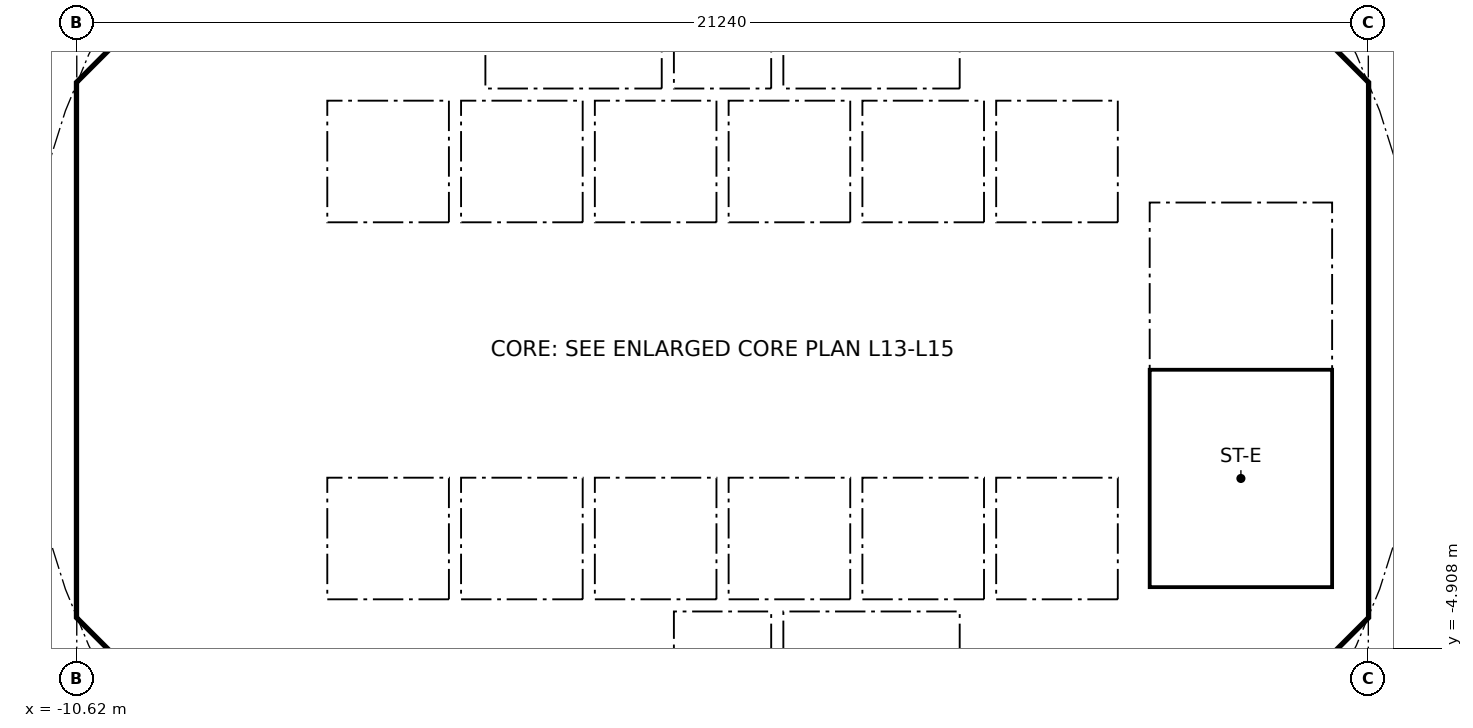
"""IFC4 building model, lengths in metres.
Left out: names, types, materials, properties, quantities, classifications, styles, units other than length and angle.
Written with IfcOpenShell. Run it as: python <this file> out.ifc"""

import sys

from ifc_helpers import new_model, si_unit, direction, frame, frame_2d, origin, place, context, subcontext, project, spatial, polyline, rectangle, outline, extrude, element, fill, save


model = new_model("IFC4")
c1 = context("Model", 3, precision=1e-05, world=origin(), true_north=direction((0.0, 1.0)))
c2 = subcontext(c1, "Body", "Model", "MODEL_VIEW")
j1 = project(units=[si_unit("LENGTHUNIT", "METRE"), si_unit("PLANEANGLEUNIT", "RADIAN")], contexts=[c1])
p1 = place(None, origin())
s1 = spatial("IfcSite", under=j1, at=p1, CompositionType="ELEMENT")
p2 = place(p1, origin())
s2 = spatial("IfcBuilding", under=s1, at=p2, CompositionType="ELEMENT")
p3 = place(p2, frame((0.0, 0.0, 56.6)))
s3 = spatial("IfcBuildingStorey", under=s2, at=p3, CompositionType="ELEMENT", Elevation=56.6)
p4 = place(p3, frame((9.988, 4.613, 0.0), z_axis=(0.0, 0.0, 1.0), x_axis=(-0.707106781187, 0.707106781187, 0.0)))
e1 = element("IfcWall", 1, at=p4, inside=s3, PredefinedType="SHEAR", context=c2, shape_type="SweptSolid", body=[
    extrude(rectangle(XDim=7.602, YDim=0.6, at=frame_2d((3.801, 0.0))), origin(), (0.0, 0.0, 1.0), 3.44),
])
p5 = place(p4, frame((3.201, 0.0, 0.0)))
e2 = element("IfcOpeningElement", 2, at=p5, cuts=e1, PredefinedType="OPENING", context=c2, shape_type="SweptSolid", body=[
    extrude(rectangle(XDim=1.2, YDim=2.1, at=frame_2d((0.6, 1.05))), frame((0.0, 0.31, 0.0), z_axis=(0.0, -1.0, 0.0), x_axis=(1.0, 0.0, 0.0)), (0.0, 0.0, 1.0), 0.62),
])
p6 = place(p3, frame((-4.613, 9.988, 0.0), z_axis=(0.0, 0.0, 1.0), x_axis=(-0.707106781187, -0.707106781187, 0.0)))
e3 = element("IfcWall", 3, at=p6, inside=s3, PredefinedType="SHEAR", context=c2, shape_type="SweptSolid", body=[
    extrude(rectangle(XDim=7.602, YDim=0.6, at=frame_2d((3.801, 0.0))), origin(), (0.0, 0.0, 1.0), 3.44),
])
p7 = place(p6, frame((0.351, 0.0, 0.0)))
e4 = element("IfcOpeningElement", 4, at=p7, cuts=e3, PredefinedType="OPENING", context=c2, shape_type="SweptSolid", body=[
    extrude(rectangle(XDim=1.1, YDim=2.1, at=frame_2d((0.55, 1.05))), frame((0.0, 0.31, 0.0), z_axis=(0.0, -1.0, 0.0), x_axis=(1.0, 0.0, 0.0)), (0.0, 0.0, 1.0), 0.62),
])
p8 = place(p3, frame((-10.325, 3.801, 0.0), z_axis=(0.0, 0.0, 1.0), x_axis=(0.0, -1.0, 0.0)))
e5 = element("IfcWall", 5, at=p8, inside=s3, PredefinedType="SHEAR", context=c2, shape_type="SweptSolid", body=[
    extrude(rectangle(XDim=7.602, YDim=0.6, at=frame_2d((3.801, 0.0))), origin(), (0.0, 0.0, 1.0), 3.44),
])
p9 = place(p8, frame((0.651, 0.0, 0.0)))
e6 = element("IfcOpeningElement", 6, at=p9, cuts=e5, PredefinedType="OPENING", context=c2, shape_type="SweptSolid", body=[
    extrude(rectangle(XDim=1.5, YDim=2.1, at=frame_2d((0.75, 1.05))), frame((0.0, 0.31, 0.0), z_axis=(0.0, -1.0, 0.0), x_axis=(1.0, 0.0, 0.0)), (0.0, 0.0, 1.0), 0.62),
])
p10 = place(p8, frame((5.451, 0.0, 0.0)))
e7 = element("IfcOpeningElement", 7, at=p10, cuts=e5, PredefinedType="OPENING", context=c2, shape_type="SweptSolid", body=[
    extrude(rectangle(XDim=1.5, YDim=2.1, at=frame_2d((0.75, 1.05))), frame((0.0, 0.31, 0.0), z_axis=(0.0, -1.0, 0.0), x_axis=(1.0, 0.0, 0.0)), (0.0, 0.0, 1.0), 0.62),
])
p11 = place(p3, frame((-9.988, -4.613, 0.0), z_axis=(0.0, 0.0, 1.0), x_axis=(0.707106781187, -0.707106781187, 0.0)))
e8 = element("IfcWall", 8, at=p11, inside=s3, PredefinedType="SHEAR", context=c2, shape_type="SweptSolid", body=[
    extrude(rectangle(XDim=7.602, YDim=0.6, at=frame_2d((3.801, 0.0))), origin(), (0.0, 0.0, 1.0), 3.44),
])
p12 = place(p11, frame((6.151, 0.0, 0.0)))
e9 = element("IfcOpeningElement", 9, at=p12, cuts=e8, PredefinedType="OPENING", context=c2, shape_type="SweptSolid", body=[
    extrude(rectangle(XDim=1.1, YDim=2.1, at=frame_2d((0.55, 1.05))), frame((0.0, 0.31, 0.0), z_axis=(0.0, -1.0, 0.0), x_axis=(1.0, 0.0, 0.0)), (0.0, 0.0, 1.0), 0.62),
])
p13 = place(p3, frame((4.613, -9.988, 0.0), z_axis=(0.0, 0.0, 1.0), x_axis=(0.707106781187, 0.707106781187, 0.0)))
e10 = element("IfcWall", 10, at=p13, inside=s3, PredefinedType="SHEAR", context=c2, shape_type="SweptSolid", body=[
    extrude(rectangle(XDim=7.602, YDim=0.6, at=frame_2d((3.801, 0.0))), origin(), (0.0, 0.0, 1.0), 3.44),
])
p14 = place(p13, frame((3.201, 0.0, 0.0)))
e11 = element("IfcOpeningElement", 11, at=p14, cuts=e10, PredefinedType="OPENING", context=c2, shape_type="SweptSolid", body=[
    extrude(rectangle(XDim=1.2, YDim=2.1, at=frame_2d((0.6, 1.05))), frame((0.0, 0.31, 0.0), z_axis=(0.0, -1.0, 0.0), x_axis=(1.0, 0.0, 0.0)), (0.0, 0.0, 1.0), 0.62),
])
p15 = place(p3, frame((-5.8, 4.3, 0.0), z_axis=(0.0, 0.0, 1.0), x_axis=(0.0, 1.0, 0.0)))
e12 = element("IfcWall", 12, at=p15, inside=s3, PredefinedType="PARTITIONING", context=c2, shape_type="SweptSolid", body=[
    extrude(rectangle(XDim=3.927, YDim=0.15, at=frame_2d((1.963, 0.0))), origin(), (0.0, 0.0, 1.0), 3.44),
])
p16 = place(p15, frame((0.413, 0.0, 0.0)))
e13 = element("IfcOpeningElement", 13, at=p16, cuts=e12, PredefinedType="OPENING", context=c2, shape_type="SweptSolid", body=[
    extrude(rectangle(XDim=0.9, YDim=2.1, at=frame_2d((0.45, 1.05))), frame((0.0, 0.085, 0.0), z_axis=(0.0, -1.0, 0.0), x_axis=(1.0, 0.0, 0.0)), (0.0, 0.0, 1.0), 0.17),
])
p17 = place(p15, frame((2.489, 0.0, 0.0)))
e14 = element("IfcOpeningElement", 14, at=p17, cuts=e12, PredefinedType="OPENING", context=c2, shape_type="SweptSolid", body=[
    extrude(rectangle(XDim=0.9, YDim=2.1, at=frame_2d((0.45, 1.05))), frame((0.0, 0.085, 0.0), z_axis=(0.0, -1.0, 0.0), x_axis=(1.0, 0.0, 0.0)), (0.0, 0.0, 1.0), 0.17),
])
p18 = place(p3, frame((4.0, 4.3, 0.0), z_axis=(0.0, 0.0, 1.0), x_axis=(0.0, 1.0, 0.0)))
e15 = element("IfcWall", 15, at=p18, inside=s3, PredefinedType="SOLIDWALL", context=c2, shape_type="SweptSolid", body=[
    extrude(rectangle(XDim=2.2, YDim=0.2, at=frame_2d((1.1, 0.0))), origin(), (0.0, 0.0, 1.0), 3.44),
])
p19 = place(p18, frame((0.55, 0.0, 0.0)))
e16 = element("IfcOpeningElement", 16, at=p19, cuts=e15, PredefinedType="OPENING", context=c2, shape_type="SweptSolid", body=[
    extrude(rectangle(XDim=1.1, YDim=2.1, at=frame_2d((0.55, 1.05))), frame((0.0, 0.11, 0.0), z_axis=(0.0, -1.0, 0.0), x_axis=(1.0, 0.0, 0.0)), (0.0, 0.0, 1.0), 0.22),
])
p20 = place(p3, frame((-4.0, 4.3, 0.0), z_axis=(0.0, 0.0, 1.0), x_axis=(0.0, 1.0, 0.0)))
e17 = element("IfcWall", 17, at=p20, inside=s3, PredefinedType="SOLIDWALL", context=c2, shape_type="SweptSolid", body=[
    extrude(rectangle(XDim=2.2, YDim=0.2, at=frame_2d((1.1, 0.0))), origin(), (0.0, 0.0, 1.0), 3.44),
])
p21 = place(p20, frame((0.55, 0.0, 0.0)))
e18 = element("IfcOpeningElement", 18, at=p21, cuts=e17, PredefinedType="OPENING", context=c2, shape_type="SweptSolid", body=[
    extrude(rectangle(XDim=1.1, YDim=2.1, at=frame_2d((0.55, 1.05))), frame((0.0, 0.11, 0.0), z_axis=(0.0, -1.0, 0.0), x_axis=(1.0, 0.0, 0.0)), (0.0, 0.0, 1.0), 0.22),
])
p22 = place(p3, frame((-6.7, 2.0, 0.0), z_axis=(0.0, 0.0, 1.0), x_axis=(1.0, 0.0, 0.0)))
e19 = element("IfcWall", 19, at=p22, inside=s3, PredefinedType="SOLIDWALL", context=c2, shape_type="SweptSolid", body=[
    extrude(rectangle(XDim=13.4, YDim=0.2, at=frame_2d((6.7, 0.0))), origin(), (0.0, 0.0, 1.0), 3.44),
])
p23 = place(p22, frame((0.65, 0.0, 0.0)))
e20 = element("IfcOpeningElement", 20, at=p23, cuts=e19, PredefinedType="OPENING", context=c2, shape_type="SweptSolid", body=[
    extrude(rectangle(XDim=1.1, YDim=2.1, at=frame_2d((0.55, 1.05))), frame((0.0, 0.11, 0.0), z_axis=(0.0, -1.0, 0.0), x_axis=(1.0, 0.0, 0.0)), (0.0, 0.0, 1.0), 0.22),
])
p24 = place(p22, frame((2.85, 0.0, 0.0)))
e21 = element("IfcOpeningElement", 21, at=p24, cuts=e19, PredefinedType="OPENING", context=c2, shape_type="SweptSolid", body=[
    extrude(rectangle(XDim=1.1, YDim=2.1, at=frame_2d((0.55, 1.05))), frame((0.0, 0.11, 0.0), z_axis=(0.0, -1.0, 0.0), x_axis=(1.0, 0.0, 0.0)), (0.0, 0.0, 1.0), 0.22),
])
p25 = place(p22, frame((5.05, 0.0, 0.0)))
e22 = element("IfcOpeningElement", 22, at=p25, cuts=e19, PredefinedType="OPENING", context=c2, shape_type="SweptSolid", body=[
    extrude(rectangle(XDim=1.1, YDim=2.1, at=frame_2d((0.55, 1.05))), frame((0.0, 0.11, 0.0), z_axis=(0.0, -1.0, 0.0), x_axis=(1.0, 0.0, 0.0)), (0.0, 0.0, 1.0), 0.22),
])
p26 = place(p3, frame((6.7, 4.0, 0.0), z_axis=(0.0, 0.0, 1.0), x_axis=(1.0, 0.0, 0.0)))
e23 = element("IfcWall", 23, at=p26, inside=s3, PredefinedType="SOLIDWALL", context=c2, shape_type="SweptSolid", body=[
    extrude(rectangle(XDim=3.325, YDim=0.2, at=frame_2d((1.662, 0.0))), origin(), (0.0, 0.0, 1.0), 3.44),
])
p27 = place(p26, frame((1.25, 0.0, 0.0)))
e24 = element("IfcOpeningElement", 24, at=p27, cuts=e23, PredefinedType="OPENING", context=c2, shape_type="SweptSolid", body=[
    extrude(rectangle(XDim=1.1, YDim=2.1, at=frame_2d((0.55, 1.05))), frame((0.0, 0.11, 0.0), z_axis=(0.0, -1.0, 0.0), x_axis=(1.0, 0.0, 0.0)), (0.0, 0.0, 1.0), 0.22),
])
p28 = place(p3, frame((-7.4, -6.627, 0.0), z_axis=(0.0, 0.0, 1.0), x_axis=(0.0, 1.0, 0.0)))
e25 = element("IfcWall", 25, at=p28, inside=s3, PredefinedType="PARTITIONING", context=c2, shape_type="SweptSolid", body=[
    extrude(rectangle(XDim=2.527, YDim=0.15, at=frame_2d((1.263, 0.0))), origin(), (0.0, 0.0, 1.0), 3.44),
])
p29 = place(p28, frame((0.776, 0.0, 0.0)))
e26 = element("IfcOpeningElement", 26, at=p29, cuts=e25, PredefinedType="OPENING", context=c2, shape_type="SweptSolid", body=[
    extrude(rectangle(XDim=0.9, YDim=2.1, at=frame_2d((0.45, 1.05))), frame((0.0, 0.085, 0.0), z_axis=(0.0, -1.0, 0.0), x_axis=(1.0, 0.0, 0.0)), (0.0, 0.0, 1.0), 0.17),
])
p30 = place(p3, frame((4.0, -6.5, 0.0), z_axis=(0.0, 0.0, 1.0), x_axis=(0.0, 1.0, 0.0)))
e27 = element("IfcWall", 27, at=p30, inside=s3, PredefinedType="SOLIDWALL", context=c2, shape_type="SweptSolid", body=[
    extrude(rectangle(XDim=2.2, YDim=0.2, at=frame_2d((1.1, 0.0))), origin(), (0.0, 0.0, 1.0), 3.44),
])
p31 = place(p30, frame((0.55, 0.0, 0.0)))
e28 = element("IfcOpeningElement", 28, at=p31, cuts=e27, PredefinedType="OPENING", context=c2, shape_type="SweptSolid", body=[
    extrude(rectangle(XDim=1.1, YDim=2.1, at=frame_2d((0.55, 1.05))), frame((0.0, 0.11, 0.0), z_axis=(0.0, -1.0, 0.0), x_axis=(1.0, 0.0, 0.0)), (0.0, 0.0, 1.0), 0.22),
])
p32 = place(p3, frame((-4.0, -6.5, 0.0), z_axis=(0.0, 0.0, 1.0), x_axis=(0.0, 1.0, 0.0)))
e29 = element("IfcWall", 29, at=p32, inside=s3, PredefinedType="SOLIDWALL", context=c2, shape_type="SweptSolid", body=[
    extrude(rectangle(XDim=2.2, YDim=0.2, at=frame_2d((1.1, 0.0))), origin(), (0.0, 0.0, 1.0), 3.44),
])
p33 = place(p32, frame((0.65, 0.0, 0.0)))
e30 = element("IfcOpeningElement", 30, at=p33, cuts=e29, PredefinedType="OPENING", context=c2, shape_type="SweptSolid", body=[
    extrude(rectangle(XDim=0.9, YDim=2.1, at=frame_2d((0.45, 1.05))), frame((0.0, 0.11, 0.0), z_axis=(0.0, -1.0, 0.0), x_axis=(1.0, 0.0, 0.0)), (0.0, 0.0, 1.0), 0.22),
])
p34 = place(p3, frame((-6.7, -2.0, 0.0), z_axis=(0.0, 0.0, 1.0), x_axis=(1.0, 0.0, 0.0)))
e31 = element("IfcWall", 31, at=p34, inside=s3, PredefinedType="SOLIDWALL", context=c2, shape_type="SweptSolid", body=[
    extrude(rectangle(XDim=13.4, YDim=0.2, at=frame_2d((6.7, 0.0))), origin(), (0.0, 0.0, 1.0), 3.44),
])
p35 = place(p34, frame((0.65, 0.0, 0.0)))
e32 = element("IfcOpeningElement", 32, at=p35, cuts=e31, PredefinedType="OPENING", context=c2, shape_type="SweptSolid", body=[
    extrude(rectangle(XDim=1.1, YDim=2.1, at=frame_2d((0.55, 1.05))), frame((0.0, 0.11, 0.0), z_axis=(0.0, -1.0, 0.0), x_axis=(1.0, 0.0, 0.0)), (0.0, 0.0, 1.0), 0.22),
])
p36 = place(p34, frame((2.85, 0.0, 0.0)))
e33 = element("IfcOpeningElement", 33, at=p36, cuts=e31, PredefinedType="OPENING", context=c2, shape_type="SweptSolid", body=[
    extrude(rectangle(XDim=1.1, YDim=2.1, at=frame_2d((0.55, 1.05))), frame((0.0, 0.11, 0.0), z_axis=(0.0, -1.0, 0.0), x_axis=(1.0, 0.0, 0.0)), (0.0, 0.0, 1.0), 0.22),
])
p37 = place(p3, origin())
e34 = element("IfcWall", 34, at=p37, inside=s3, PredefinedType="SHEAR", context=c2, shape_type="SweptSolid", body=[
    extrude(outline(polyline([(-10.625, -3.801), (-10.025, -3.801), (-10.025, -4.152), (-9.776, -4.401), (-10.2, -4.825), (-10.625, -4.401), (-10.625, -3.801)])), origin(), (0.0, 0.0, 1.0), 3.44),
])
p38 = place(p3, origin())
e35 = element("IfcWall", 35, at=p38, inside=s3, PredefinedType="SHEAR", context=c2, shape_type="SweptSolid", body=[
    extrude(outline(polyline([(-10.2, 4.825), (-9.776, 4.401), (-10.025, 4.152), (-10.025, 3.801), (-10.625, 3.801), (-10.625, 4.401), (-10.2, 4.825)])), origin(), (0.0, 0.0, 1.0), 3.44),
])
p39 = place(p3, origin())
e36 = element("IfcWall", 36, at=p39, inside=s3, PredefinedType="SHEAR", context=c2, shape_type="SweptSolid", body=[
    extrude(outline(polyline([(9.776, -4.401), (10.025, -4.152), (10.025, -3.801), (10.025, 4.152), (9.776, 4.401), (10.2, 4.825), (10.625, 4.401), (10.625, -4.401), (10.2, -4.825), (9.776, -4.401)])), origin(), (0.0, 0.0, 1.0), 3.44),
])
for number, where, z_axis, x_axis in (
    (37, (-10.025, -4.0, 0.0), (0.0, 0.0, 1.0), (1.0, 0.0, 0.0)),
    (38, (-10.025, 4.0, 0.0), (0.0, 0.0, 1.0), (1.0, 0.0, 0.0)),
):
    element("IfcWall", number, at=place(p3, frame(where, z_axis=z_axis, x_axis=x_axis)), inside=s3, PredefinedType="PARTITIONING", context=c2, shape_type="SweptSolid", body=[
        extrude(rectangle(XDim=3.325, YDim=0.2, at=frame_2d((1.662, 0.0))), origin(), (0.0, 0.0, 1.0), 3.44),
    ])
for number, where, z_axis, x_axis in (
    (39, (-0.9, -6.5, 0.0), (0.0, 0.0, 1.0), (0.0, 1.0, 0.0)),
    (40, (0.9, -6.5, 0.0), (0.0, 0.0, 1.0), (0.0, 1.0, 0.0)),
):
    element("IfcWall", number, at=place(p3, frame(where, z_axis=z_axis, x_axis=x_axis)), inside=s3, PredefinedType="SOLIDWALL", context=c2, shape_type="SweptSolid", body=[
        extrude(rectangle(XDim=2.2, YDim=0.2, at=frame_2d((1.1, 0.0))), origin(), (0.0, 0.0, 1.0), 3.44),
    ])
p40 = place(p3, origin())
e41 = element("IfcWall", 41, at=p40, inside=s3, PredefinedType="SOLIDWALL", context=c2, shape_type="SweptSolid", body=[
    extrude(outline(polyline([(-6.7, -2.1), (-6.5, -2.1), (-6.5, -4.1), (-4.5, -4.1), (-4.5, -2.1), (-4.3, -2.1), (-4.3, -4.1), (-2.3, -4.1), (-2.3, -2.1), (-2.1, -2.1), (-2.1, -4.1), (-0.1, -4.1), (-0.1, -2.1), (0.1, -2.1), (0.1, -4.1), (2.1, -4.1), (2.1, -2.1), (2.3, -2.1), (2.3, -4.1), (4.3, -4.1), (4.3, -2.1), (4.5, -2.1), (4.5, -4.1), (6.5, -4.1), (6.5, -2.1), (6.7, -2.1), (6.7, -4.3), (-6.7, -4.3), (-6.7, -2.1)])), origin(), (0.0, 0.0, 1.0), 3.44),
])
for number, where, z_axis, x_axis in (
    (42, (-0.9, 4.3, 0.0), (0.0, 0.0, 1.0), (0.0, 1.0, 0.0)),
    (43, (0.9, 4.3, 0.0), (0.0, 0.0, 1.0), (0.0, 1.0, 0.0)),
):
    element("IfcWall", number, at=place(p3, frame(where, z_axis=z_axis, x_axis=x_axis)), inside=s3, PredefinedType="SOLIDWALL", context=c2, shape_type="SweptSolid", body=[
        extrude(rectangle(XDim=2.2, YDim=0.2, at=frame_2d((1.1, 0.0))), origin(), (0.0, 0.0, 1.0), 3.44),
    ])
p41 = place(p3, origin())
e44 = element("IfcWall", 44, at=p41, inside=s3, PredefinedType="SOLIDWALL", context=c2, shape_type="SweptSolid", body=[
    extrude(outline(polyline([(-6.5, 2.1), (-6.7, 2.1), (-6.7, 4.3), (6.7, 4.3), (6.7, 2.1), (6.5, 2.1), (6.5, 4.1), (4.5, 4.1), (4.5, 2.1), (4.3, 2.1), (4.3, 4.1), (2.3, 4.1), (2.3, 2.1), (2.1, 2.1), (2.1, 4.1), (0.1, 4.1), (0.1, 2.1), (-0.1, 2.1), (-0.1, 4.1), (-2.1, 4.1), (-2.1, 2.1), (-2.3, 2.1), (-2.3, 4.1), (-4.3, 4.1), (-4.3, 2.1), (-4.5, 2.1), (-4.5, 4.1), (-6.5, 4.1), (-6.5, 2.1)])), origin(), (0.0, 0.0, 1.0), 3.44),
])
p42 = place(p3, origin())
e45 = element("IfcWall", 45, at=p42, inside=s3, PredefinedType="SOLIDWALL", context=c2, shape_type="SweptSolid", body=[
    extrude(outline(polyline([(7.025, -3.9), (6.7, -3.9), (6.7, 3.9), (7.025, 3.9), (7.025, -3.9)])), origin(), (0.0, 0.0, 1.0), 3.44),
])
p43 = place(p3, origin())
e46 = element("IfcWall", 46, at=p43, inside=s3, PredefinedType="SOLIDWALL", context=c2, shape_type="SweptSolid", body=[
    extrude(outline(polyline([(10.025, -4.1), (6.7, -4.1), (6.7, -3.9), (10.025, -3.9), (10.025, -4.1)])), origin(), (0.0, 0.0, 1.0), 3.44),
])
p44 = place(p23, origin())
e47 = element("IfcDoor", 47, at=p44, inside=s3, OperationType="DOUBLE_DOOR_SLIDING", PredefinedType="DOOR", context=c2, shape_type="SweptSolid", body=[
    extrude(rectangle(XDim=1.1, YDim=2.1, at=frame_2d((0.55, 1.05))), frame((0.0, 0.025, 0.0), z_axis=(0.0, -1.0, 0.0), x_axis=(1.0, 0.0, 0.0)), (0.0, 0.0, 1.0), 0.05),
])
fill(e20, e47)
p45 = place(p24, origin())
e48 = element("IfcDoor", 48, at=p45, inside=s3, OperationType="DOUBLE_DOOR_SLIDING", PredefinedType="DOOR", context=c2, shape_type="SweptSolid", body=[
    extrude(rectangle(XDim=1.1, YDim=2.1, at=frame_2d((0.55, 1.05))), frame((0.0, 0.025, 0.0), z_axis=(0.0, -1.0, 0.0), x_axis=(1.0, 0.0, 0.0)), (0.0, 0.0, 1.0), 0.05),
])
fill(e21, e48)
p46 = place(p25, origin())
e49 = element("IfcDoor", 49, at=p46, inside=s3, OperationType="DOUBLE_DOOR_SLIDING", PredefinedType="DOOR", context=c2, shape_type="SweptSolid", body=[
    extrude(rectangle(XDim=1.1, YDim=2.1, at=frame_2d((0.55, 1.05))), frame((0.0, 0.025, 0.0), z_axis=(0.0, -1.0, 0.0), x_axis=(1.0, 0.0, 0.0)), (0.0, 0.0, 1.0), 0.05),
])
fill(e22, e49)
p47 = place(p35, origin())
e50 = element("IfcDoor", 50, at=p47, inside=s3, OperationType="DOUBLE_DOOR_SLIDING", PredefinedType="DOOR", context=c2, shape_type="SweptSolid", body=[
    extrude(rectangle(XDim=1.1, YDim=2.1, at=frame_2d((0.55, 1.05))), frame((0.0, 0.025, 0.0), z_axis=(0.0, -1.0, 0.0), x_axis=(1.0, 0.0, 0.0)), (0.0, 0.0, 1.0), 0.05),
])
fill(e32, e50)
p48 = place(p36, origin())
e51 = element("IfcDoor", 51, at=p48, inside=s3, OperationType="DOUBLE_DOOR_SLIDING", PredefinedType="DOOR", context=c2, shape_type="SweptSolid", body=[
    extrude(rectangle(XDim=1.1, YDim=2.1, at=frame_2d((0.55, 1.05))), frame((0.0, 0.025, 0.0), z_axis=(0.0, -1.0, 0.0), x_axis=(1.0, 0.0, 0.0)), (0.0, 0.0, 1.0), 0.05),
])
fill(e33, e51)
p49 = place(p19, origin())
e52 = element("IfcDoor", 52, at=p49, inside=s3, OperationType="DOUBLE_DOOR_SLIDING", PredefinedType="DOOR", context=c2, shape_type="SweptSolid", body=[
    extrude(rectangle(XDim=1.1, YDim=2.1, at=frame_2d((0.55, 1.05))), frame((0.0, 0.025, 0.0), z_axis=(0.0, -1.0, 0.0), x_axis=(1.0, 0.0, 0.0)), (0.0, 0.0, 1.0), 0.05),
])
fill(e16, e52)
p50 = place(p31, origin())
e53 = element("IfcDoor", 53, at=p50, inside=s3, OperationType="DOUBLE_DOOR_SLIDING", PredefinedType="DOOR", context=c2, shape_type="SweptSolid", body=[
    extrude(rectangle(XDim=1.1, YDim=2.1, at=frame_2d((0.55, 1.05))), frame((0.0, 0.025, 0.0), z_axis=(0.0, -1.0, 0.0), x_axis=(1.0, 0.0, 0.0)), (0.0, 0.0, 1.0), 0.05),
])
fill(e28, e53)
p51 = place(p21, origin())
e54 = element("IfcDoor", 54, at=p51, inside=s3, OperationType="DOUBLE_DOOR_SLIDING", PredefinedType="DOOR", context=c2, shape_type="SweptSolid", body=[
    extrude(rectangle(XDim=1.1, YDim=2.1, at=frame_2d((0.55, 1.05))), frame((0.0, 0.025, 0.0), z_axis=(0.0, -1.0, 0.0), x_axis=(1.0, 0.0, 0.0)), (0.0, 0.0, 1.0), 0.05),
])
fill(e18, e54)
p52 = place(p27, frame((1.1, 0.0, 0.0), x_axis=(-1.0, 0.0, 0.0)))
e55 = element("IfcDoor", 55, at=p52, inside=s3, OperationType="SINGLE_SWING_RIGHT", PredefinedType="DOOR", context=c2, shape_type="SweptSolid", body=[
    extrude(rectangle(XDim=1.1, YDim=2.1, at=frame_2d((0.55, 1.05))), frame((0.0, 0.025, 0.0), z_axis=(0.0, -1.0, 0.0), x_axis=(1.0, 0.0, 0.0)), (0.0, 0.0, 1.0), 0.05),
])
fill(e24, e55)
p53 = place(p16, origin())
e56 = element("IfcDoor", 56, at=p53, inside=s3, OperationType="SINGLE_SWING_RIGHT", PredefinedType="DOOR", context=c2, shape_type="SweptSolid", body=[
    extrude(rectangle(XDim=0.9, YDim=2.1, at=frame_2d((0.45, 1.05))), frame((0.0, 0.025, 0.0), z_axis=(0.0, -1.0, 0.0), x_axis=(1.0, 0.0, 0.0)), (0.0, 0.0, 1.0), 0.05),
])
fill(e13, e56)
p54 = place(p9, origin())
e57 = element("IfcDoor", 57, at=p54, inside=s3, OperationType="DOUBLE_DOOR_SINGLE_SWING", PredefinedType="DOOR", context=c2, shape_type="SweptSolid", body=[
    extrude(rectangle(XDim=1.5, YDim=2.1, at=frame_2d((0.75, 1.05))), frame((0.0, 0.025, 0.0), z_axis=(0.0, -1.0, 0.0), x_axis=(1.0, 0.0, 0.0)), (0.0, 0.0, 1.0), 0.05),
])
fill(e6, e57)
p55 = place(p10, origin())
e58 = element("IfcDoor", 58, at=p55, inside=s3, OperationType="DOUBLE_DOOR_SINGLE_SWING", PredefinedType="DOOR", context=c2, shape_type="SweptSolid", body=[
    extrude(rectangle(XDim=1.5, YDim=2.1, at=frame_2d((0.75, 1.05))), frame((0.0, 0.025, 0.0), z_axis=(0.0, -1.0, 0.0), x_axis=(1.0, 0.0, 0.0)), (0.0, 0.0, 1.0), 0.05),
])
fill(e7, e58)
save(model, sys.argv[1])
